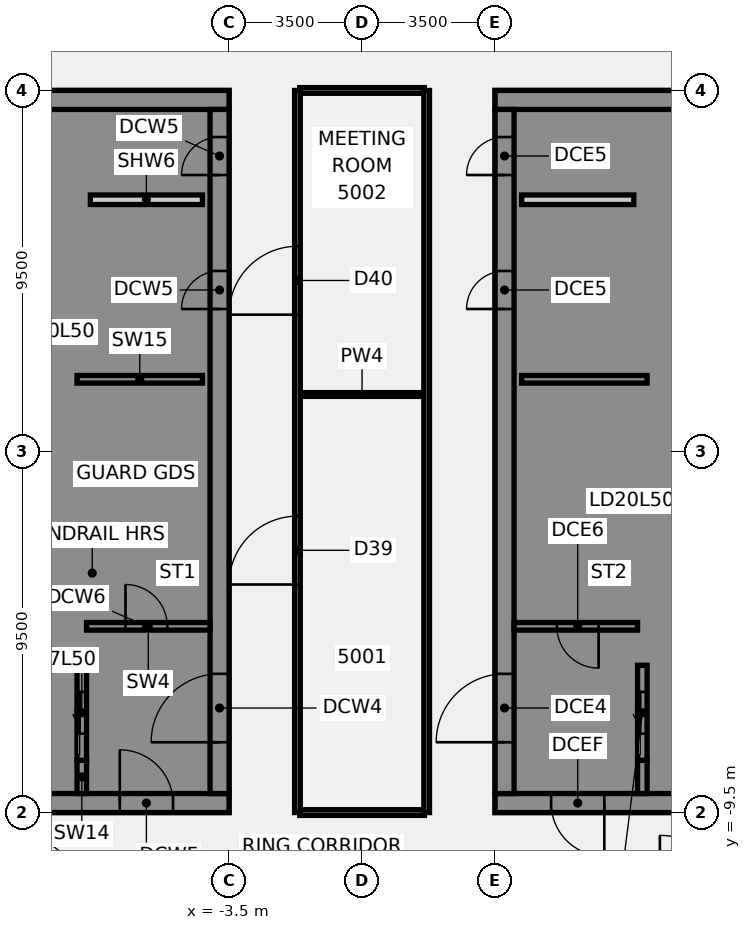
"""IFC4 building model, lengths in metres.
Left out: names, types, materials, properties, quantities, classifications, styles, units other than length and angle.
Written with IfcOpenShell. Run it as: python <this file> out.ifc"""

import sys

from ifc_helpers import new_model, si_unit, direction, frame, frame_2d, origin, place, context, subcontext, project, spatial, polyline, rectangle, outline, extrude, element, fill, save


model = new_model("IFC4")
c1 = context("Model", 3, precision=1e-05, world=origin(), true_north=direction((0.0, 1.0)))
c2 = subcontext(c1, "Body", "Model", "MODEL_VIEW")
j1 = project(units=[si_unit("LENGTHUNIT", "METRE"), si_unit("PLANEANGLEUNIT", "RADIAN")], contexts=[c1])
p1 = place(None, origin())
s1 = spatial("IfcSite", under=j1, at=p1, CompositionType="ELEMENT")
p2 = place(p1, origin())
s2 = spatial("IfcBuilding", under=s1, at=p2, CompositionType="ELEMENT")
p3 = place(p2, frame((0.0, 0.0, 200.5)))
s3 = spatial("IfcBuildingStorey", under=s2, at=p3, CompositionType="ELEMENT", Elevation=200.5)
p4 = place(p3, frame((-1.64, -9.5, 0.0), z_axis=(0.0, 0.0, 1.0), x_axis=(1.0, 0.0, 0.0)))
e1 = element("IfcWall", 1, at=p4, inside=s3, PredefinedType="PARTITIONING", context=c2, shape_type="SweptSolid", body=[
    extrude(rectangle(XDim=3.28, YDim=0.15, at=frame_2d((1.64, 0.0))), origin(), (0.0, 0.0, 1.0), 2.864),
])
p5 = place(p3, frame((-1.64, 1.5, 0.0), z_axis=(0.0, 0.0, 1.0), x_axis=(1.0, 0.0, 0.0)))
e2 = element("IfcWall", 2, at=p5, inside=s3, PredefinedType="PARTITIONING", context=c2, shape_type="SweptSolid", body=[
    extrude(rectangle(XDim=3.28, YDim=0.1, at=frame_2d((1.64, 0.0))), origin(), (0.0, 0.0, 1.0), 2.864),
])
p6 = place(p3, frame((-1.64, 9.5, 0.0), z_axis=(0.0, 0.0, 1.0), x_axis=(1.0, 0.0, 0.0)))
e3 = element("IfcWall", 3, at=p6, inside=s3, PredefinedType="PARTITIONING", context=c2, shape_type="SweptSolid", body=[
    extrude(rectangle(XDim=3.28, YDim=0.15, at=frame_2d((1.64, 0.0))), origin(), (0.0, 0.0, 1.0), 2.864),
])
p7 = place(p3, frame((-1.7, -9.5, 0.0), z_axis=(0.0, 0.0, 1.0), x_axis=(0.0, 1.0, 0.0)))
e4 = element("IfcWall", 4, at=p7, inside=s3, PredefinedType="PARTITIONING", context=c2, shape_type="SweptSolid", body=[
    extrude(rectangle(XDim=19.0, YDim=0.15, at=frame_2d((9.5, 0.0))), origin(), (0.0, 0.0, 1.0), 2.864),
])
p8 = place(p7, frame((6.0, 0.0, 0.0)))
e5 = element("IfcOpeningElement", 5, at=p8, cuts=e4, PredefinedType="OPENING", context=c2, shape_type="SweptSolid", body=[
    extrude(rectangle(XDim=1.8, YDim=2.1, at=frame_2d((0.9, 1.05))), frame((0.0, 0.085, 0.0), z_axis=(0.0, -1.0, 0.0), x_axis=(1.0, 0.0, 0.0)), (0.0, 0.0, 1.0), 0.17),
])
p9 = place(p7, frame((13.1, 0.0, 0.0)))
e6 = element("IfcOpeningElement", 6, at=p9, cuts=e4, PredefinedType="OPENING", context=c2, shape_type="SweptSolid", body=[
    extrude(rectangle(XDim=1.8, YDim=2.1, at=frame_2d((0.9, 1.05))), frame((0.0, 0.085, 0.0), z_axis=(0.0, -1.0, 0.0), x_axis=(1.0, 0.0, 0.0)), (0.0, 0.0, 1.0), 0.17),
])
p10 = place(p3, frame((1.7, -9.5, 0.0), z_axis=(0.0, 0.0, 1.0), x_axis=(0.0, 1.0, 0.0)))
e7 = element("IfcWall", 7, at=p10, inside=s3, PredefinedType="PARTITIONING", context=c2, shape_type="SweptSolid", body=[
    extrude(rectangle(XDim=19.0, YDim=0.15, at=frame_2d((9.5, 0.0))), origin(), (0.0, 0.0, 1.0), 2.864),
])
p11 = place(p3, frame((-16.5, -9.25, 0.0), z_axis=(0.0, 0.0, 1.0), x_axis=(1.0, 0.0, 0.0)))
e8 = element("IfcWall", 8, at=p11, inside=s3, PredefinedType="SHEAR", context=c2, shape_type="SweptSolid", body=[
    extrude(rectangle(XDim=13.0, YDim=0.5, at=frame_2d((6.5, 0.0))), origin(), (0.0, 0.0, 1.0), 3.46),
])
p12 = place(p11, frame((4.15, 0.0, 0.0)))
e9 = element("IfcOpeningElement", 9, at=p12, cuts=e8, PredefinedType="OPENING", context=c2, shape_type="SweptSolid", body=[
    extrude(rectangle(XDim=1.4, YDim=2.1, at=frame_2d((0.7, 1.05))), frame((0.0, 0.26, 0.0), z_axis=(0.0, -1.0, 0.0), x_axis=(1.0, 0.0, 0.0)), (0.0, 0.0, 1.0), 0.52),
])
p13 = place(p11, frame((10.125, 0.0, 0.0)))
e10 = element("IfcOpeningElement", 10, at=p13, cuts=e8, PredefinedType="OPENING", context=c2, shape_type="SweptSolid", body=[
    extrude(rectangle(XDim=1.4, YDim=2.1, at=frame_2d((0.7, 1.05))), frame((0.0, 0.26, 0.0), z_axis=(0.0, -1.0, 0.0), x_axis=(1.0, 0.0, 0.0)), (0.0, 0.0, 1.0), 0.52),
])
p14 = place(p3, frame((-16.5, 9.25, 0.0), z_axis=(0.0, 0.0, 1.0), x_axis=(1.0, 0.0, 0.0)))
e11 = element("IfcWall", 11, at=p14, inside=s3, PredefinedType="SHEAR", context=c2, shape_type="SweptSolid", body=[
    extrude(rectangle(XDim=13.0, YDim=0.5, at=frame_2d((6.5, 0.0))), origin(), (0.0, 0.0, 1.0), 3.46),
])
p15 = place(p3, origin())
e12 = element("IfcWall", 12, at=p15, inside=s3, PredefinedType="SHEAR", context=c2, shape_type="SweptSolid", body=[
    extrude(outline(polyline([(-9.8, -5.375), (-9.8, -5.625), (-7.5, -5.625), (-7.25, -5.625), (-7.25, 9.0), (-7.5, 9.0), (-9.8, 9.0), (-9.8, 8.125), (-7.5, 8.125), (-7.5, 5.625), (-9.8, 5.625), (-9.8, 5.375), (-7.5, 5.375), (-7.5, 2.875), (-9.8, 2.875), (-9.8, 2.625), (-7.5, 2.625), (-7.5, 0.125), (-9.8, 0.125), (-9.8, -0.125), (-7.5, -0.125), (-7.5, -2.625), (-9.8, -2.625), (-9.8, -2.875), (-7.5, -2.875), (-7.5, -5.375), (-9.8, -5.375)])), origin(), (0.0, 0.0, 1.0), 3.46),
])
p16 = place(p3, origin())
e13 = element("IfcWall", 13, at=p16, inside=s3, PredefinedType="SHEAR", context=c2, shape_type="SweptSolid", body=[
    extrude(outline(polyline([(-7.5, -8.125), (-9.55, -8.125), (-9.55, -5.625), (-9.8, -5.625), (-9.8, -8.125), (-9.8, -9.0), (-7.5, -9.0), (-7.5, -8.125)])), origin(), (0.0, 0.0, 1.0), 3.46),
])
p17 = place(p3, frame((-7.375, -9.0, 0.0), z_axis=(0.0, 0.0, 1.0), x_axis=(0.0, 1.0, 0.0)))
e14 = element("IfcWall", 14, at=p17, inside=s3, PredefinedType="SHEAR", context=c2, shape_type="SweptSolid", body=[
    extrude(rectangle(XDim=0.875, YDim=0.25, at=frame_2d((0.438, 0.0))), origin(), (0.0, 0.0, 1.0), 3.46),
])
p18 = place(p3, frame((-7.5, 1.9, 0.0), z_axis=(0.0, 0.0, 1.0), x_axis=(1.0, 0.0, 0.0)))
e15 = element("IfcWall", 15, at=p18, inside=s3, PredefinedType="SHEAR", context=c2, shape_type="SweptSolid", body=[
    extrude(rectangle(XDim=3.3, YDim=0.2, at=frame_2d((1.65, 0.0))), origin(), (0.0, 0.0, 1.0), 3.46),
])
p19 = place(p3, frame((-7.375, -8.125, 0.0), z_axis=(0.0, 0.0, 1.0), x_axis=(0.0, 1.0, 0.0)))
e16 = element("IfcWall", 16, at=p19, inside=s3, PredefinedType="SHEAR", context=c2, shape_type="SweptSolid", body=[
    extrude(rectangle(XDim=2.5, YDim=0.25, at=frame_2d((1.25, 0.0))), origin(), (0.0, 0.0, 1.0), 3.46),
])
p20 = place(p19, frame((0.7, 0.0, 0.0)))
e17 = element("IfcOpeningElement", 17, at=p20, cuts=e16, PredefinedType="OPENING", context=c2, shape_type="SweptSolid", body=[
    extrude(rectangle(XDim=1.1, YDim=2.1, at=frame_2d((0.55, 1.05))), frame((0.0, 0.135, 0.0), z_axis=(0.0, -1.0, 0.0), x_axis=(1.0, 0.0, 0.0)), (0.0, 0.0, 1.0), 0.27),
])
p21 = place(p3, frame((-3.75, -9.0, 0.0), z_axis=(0.0, 0.0, 1.0), x_axis=(0.0, 1.0, 0.0)))
e18 = element("IfcWall", 18, at=p21, inside=s3, PredefinedType="SHEAR", context=c2, shape_type="SweptSolid", body=[
    extrude(rectangle(XDim=18.0, YDim=0.5, at=frame_2d((9.0, 0.0))), origin(), (0.0, 0.0, 1.0), 3.46),
])
p22 = place(p21, frame((1.35, 0.0, 0.0)))
e19 = element("IfcOpeningElement", 19, at=p22, cuts=e18, PredefinedType="OPENING", context=c2, shape_type="SweptSolid", body=[
    extrude(rectangle(XDim=1.8, YDim=2.1, at=frame_2d((0.9, 1.05))), frame((0.0, 0.26, 0.0), z_axis=(0.0, -1.0, 0.0), x_axis=(1.0, 0.0, 0.0)), (0.0, 0.0, 1.0), 0.52),
])
p23 = place(p21, frame((12.75, 0.0, 0.0)))
e20 = element("IfcOpeningElement", 20, at=p23, cuts=e18, PredefinedType="OPENING", context=c2, shape_type="SweptSolid", body=[
    extrude(rectangle(XDim=1.0, YDim=2.1, at=frame_2d((0.5, 1.05))), frame((0.0, 0.26, 0.0), z_axis=(0.0, -1.0, 0.0), x_axis=(1.0, 0.0, 0.0)), (0.0, 0.0, 1.0), 0.52),
])
p24 = place(p21, frame((16.274, 0.0, 0.0)))
e21 = element("IfcOpeningElement", 21, at=p24, cuts=e18, PredefinedType="OPENING", context=c2, shape_type="SweptSolid", body=[
    extrude(rectangle(XDim=1.0, YDim=2.1, at=frame_2d((0.5, 1.05))), frame((0.0, 0.26, 0.0), z_axis=(0.0, -1.0, 0.0), x_axis=(1.0, 0.0, 0.0)), (0.0, 0.0, 1.0), 0.52),
])
p25 = place(p3, frame((-7.15, 6.624, 0.0), z_axis=(0.0, 0.0, 1.0), x_axis=(1.0, 0.0, 0.0)))
e22 = element("IfcWall", 22, at=p25, inside=s3, PredefinedType="PARTITIONING", context=c2, shape_type="SweptSolid", body=[
    extrude(rectangle(XDim=2.95, YDim=0.25, at=frame_2d((1.475, 0.0))), origin(), (0.0, 0.0, 1.0), 3.46),
])
p26 = place(p3, frame((-7.25, -4.6, 0.0), z_axis=(0.0, 0.0, 1.0), x_axis=(1.0, 0.0, 0.0)))
e23 = element("IfcWall", 23, at=p26, inside=s3, PredefinedType="SHEAR", context=c2, shape_type="SweptSolid", body=[
    extrude(rectangle(XDim=3.25, YDim=0.2, at=frame_2d((1.625, 0.0))), origin(), (0.0, 0.0, 1.0), 3.46),
])
p27 = place(p26, frame((1.025, 0.0, 0.0)))
e24 = element("IfcOpeningElement", 24, at=p27, cuts=e23, PredefinedType="OPENING", context=c2, shape_type="SweptSolid", body=[
    extrude(rectangle(XDim=1.1, YDim=2.1, at=frame_2d((0.55, 1.05))), frame((0.0, 0.11, 0.0), z_axis=(0.0, -1.0, 0.0), x_axis=(1.0, 0.0, 0.0)), (0.0, 0.0, 1.0), 0.22),
])
p28 = place(p3, frame((16.5, -9.25, 0.0), z_axis=(0.0, 0.0, 1.0), x_axis=(-1.0, 0.0, 0.0)))
e25 = element("IfcWall", 25, at=p28, inside=s3, PredefinedType="SHEAR", context=c2, shape_type="SweptSolid", body=[
    extrude(rectangle(XDim=13.0, YDim=0.5, at=frame_2d((6.5, 0.0))), origin(), (0.0, 0.0, 1.0), 3.46),
])
p29 = place(p28, frame((4.15, 0.0, 0.0)))
e26 = element("IfcOpeningElement", 26, at=p29, cuts=e25, PredefinedType="OPENING", context=c2, shape_type="SweptSolid", body=[
    extrude(rectangle(XDim=1.4, YDim=2.1, at=frame_2d((0.7, 1.05))), frame((0.0, 0.26, 0.0), z_axis=(0.0, -1.0, 0.0), x_axis=(1.0, 0.0, 0.0)), (0.0, 0.0, 1.0), 0.52),
])
p30 = place(p28, frame((10.125, 0.0, 0.0)))
e27 = element("IfcOpeningElement", 27, at=p30, cuts=e25, PredefinedType="OPENING", context=c2, shape_type="SweptSolid", body=[
    extrude(rectangle(XDim=1.4, YDim=2.1, at=frame_2d((0.7, 1.05))), frame((0.0, 0.26, 0.0), z_axis=(0.0, -1.0, 0.0), x_axis=(1.0, 0.0, 0.0)), (0.0, 0.0, 1.0), 0.52),
])
p31 = place(p3, frame((16.5, 9.25, 0.0), z_axis=(0.0, 0.0, 1.0), x_axis=(-1.0, 0.0, 0.0)))
e28 = element("IfcWall", 28, at=p31, inside=s3, PredefinedType="SHEAR", context=c2, shape_type="SweptSolid", body=[
    extrude(rectangle(XDim=13.0, YDim=0.5, at=frame_2d((6.5, 0.0))), origin(), (0.0, 0.0, 1.0), 3.46),
])
p32 = place(p3, origin())
e29 = element("IfcWall", 29, at=p32, inside=s3, PredefinedType="SHEAR", context=c2, shape_type="SweptSolid", body=[
    extrude(outline(polyline([(9.8, -5.375), (7.5, -5.375), (7.5, -2.875), (9.8, -2.875), (9.8, -2.625), (7.5, -2.625), (7.5, -0.125), (9.8, -0.125), (9.8, 0.125), (7.5, 0.125), (7.5, 2.625), (9.8, 2.625), (9.8, 2.875), (7.5, 2.875), (7.5, 5.375), (9.8, 5.375), (9.8, 5.625), (7.5, 5.625), (7.5, 8.125), (9.8, 8.125), (9.8, 9.0), (7.5, 9.0), (7.25, 9.0), (7.25, -5.625), (7.5, -5.625), (9.8, -5.625), (9.8, -5.375)])), origin(), (0.0, 0.0, 1.0), 3.46),
])
p33 = place(p3, origin())
e30 = element("IfcWall", 30, at=p33, inside=s3, PredefinedType="SHEAR", context=c2, shape_type="SweptSolid", body=[
    extrude(outline(polyline([(7.5, -8.125), (7.5, -9.0), (9.8, -9.0), (9.8, -8.125), (9.8, -5.625), (9.55, -5.625), (9.55, -8.125), (7.5, -8.125)])), origin(), (0.0, 0.0, 1.0), 3.46),
])
p34 = place(p3, frame((7.375, -9.0, 0.0), z_axis=(0.0, 0.0, 1.0), x_axis=(0.0, 1.0, 0.0)))
e31 = element("IfcWall", 31, at=p34, inside=s3, PredefinedType="SHEAR", context=c2, shape_type="SweptSolid", body=[
    extrude(rectangle(XDim=0.875, YDim=0.25, at=frame_2d((0.438, 0.0))), origin(), (0.0, 0.0, 1.0), 3.46),
])
p35 = place(p3, frame((7.5, 1.9, 0.0), z_axis=(0.0, 0.0, 1.0), x_axis=(-1.0, 0.0, 0.0)))
e32 = element("IfcWall", 32, at=p35, inside=s3, PredefinedType="SHEAR", context=c2, shape_type="SweptSolid", body=[
    extrude(rectangle(XDim=3.3, YDim=0.2, at=frame_2d((1.65, 0.0))), origin(), (0.0, 0.0, 1.0), 3.46),
])
p36 = place(p3, frame((7.375, -8.125, 0.0), z_axis=(0.0, 0.0, 1.0), x_axis=(0.0, 1.0, 0.0)))
e33 = element("IfcWall", 33, at=p36, inside=s3, PredefinedType="SHEAR", context=c2, shape_type="SweptSolid", body=[
    extrude(rectangle(XDim=2.5, YDim=0.25, at=frame_2d((1.25, 0.0))), origin(), (0.0, 0.0, 1.0), 3.46),
])
p37 = place(p36, frame((0.7, 0.0, 0.0)))
e34 = element("IfcOpeningElement", 34, at=p37, cuts=e33, PredefinedType="OPENING", context=c2, shape_type="SweptSolid", body=[
    extrude(rectangle(XDim=1.1, YDim=2.1, at=frame_2d((0.55, 1.05))), frame((0.0, 0.135, 0.0), z_axis=(0.0, -1.0, 0.0), x_axis=(1.0, 0.0, 0.0)), (0.0, 0.0, 1.0), 0.27),
])
p38 = place(p3, frame((3.75, -9.0, 0.0), z_axis=(0.0, 0.0, 1.0), x_axis=(0.0, 1.0, 0.0)))
e35 = element("IfcWall", 35, at=p38, inside=s3, PredefinedType="SHEAR", context=c2, shape_type="SweptSolid", body=[
    extrude(rectangle(XDim=18.0, YDim=0.5, at=frame_2d((9.0, 0.0))), origin(), (0.0, 0.0, 1.0), 3.46),
])
p39 = place(p38, frame((1.35, 0.0, 0.0)))
e36 = element("IfcOpeningElement", 36, at=p39, cuts=e35, PredefinedType="OPENING", context=c2, shape_type="SweptSolid", body=[
    extrude(rectangle(XDim=1.8, YDim=2.1, at=frame_2d((0.9, 1.05))), frame((0.0, 0.26, 0.0), z_axis=(0.0, -1.0, 0.0), x_axis=(1.0, 0.0, 0.0)), (0.0, 0.0, 1.0), 0.52),
])
p40 = place(p38, frame((12.75, 0.0, 0.0)))
e37 = element("IfcOpeningElement", 37, at=p40, cuts=e35, PredefinedType="OPENING", context=c2, shape_type="SweptSolid", body=[
    extrude(rectangle(XDim=1.0, YDim=2.1, at=frame_2d((0.5, 1.05))), frame((0.0, 0.26, 0.0), z_axis=(0.0, -1.0, 0.0), x_axis=(1.0, 0.0, 0.0)), (0.0, 0.0, 1.0), 0.52),
])
p41 = place(p38, frame((16.274, 0.0, 0.0)))
e38 = element("IfcOpeningElement", 38, at=p41, cuts=e35, PredefinedType="OPENING", context=c2, shape_type="SweptSolid", body=[
    extrude(rectangle(XDim=1.0, YDim=2.1, at=frame_2d((0.5, 1.05))), frame((0.0, 0.26, 0.0), z_axis=(0.0, -1.0, 0.0), x_axis=(1.0, 0.0, 0.0)), (0.0, 0.0, 1.0), 0.52),
])
p42 = place(p3, frame((7.15, 6.624, 0.0), z_axis=(0.0, 0.0, 1.0), x_axis=(-1.0, 0.0, 0.0)))
e39 = element("IfcWall", 39, at=p42, inside=s3, PredefinedType="PARTITIONING", context=c2, shape_type="SweptSolid", body=[
    extrude(rectangle(XDim=2.95, YDim=0.25, at=frame_2d((1.475, 0.0))), origin(), (0.0, 0.0, 1.0), 3.46),
])
p43 = place(p3, frame((7.25, -4.6, 0.0), z_axis=(0.0, 0.0, 1.0), x_axis=(-1.0, 0.0, 0.0)))
e40 = element("IfcWall", 40, at=p43, inside=s3, PredefinedType="SHEAR", context=c2, shape_type="SweptSolid", body=[
    extrude(rectangle(XDim=3.25, YDim=0.2, at=frame_2d((1.625, 0.0))), origin(), (0.0, 0.0, 1.0), 3.46),
])
p44 = place(p43, frame((1.025, 0.0, 0.0)))
e41 = element("IfcOpeningElement", 41, at=p44, cuts=e40, PredefinedType="OPENING", context=c2, shape_type="SweptSolid", body=[
    extrude(rectangle(XDim=1.1, YDim=2.1, at=frame_2d((0.55, 1.05))), frame((0.0, 0.11, 0.0), z_axis=(0.0, -1.0, 0.0), x_axis=(1.0, 0.0, 0.0)), (0.0, 0.0, 1.0), 0.22),
])
p45 = place(p8, frame((1.8, 0.0, 0.0), z_axis=(0.0, 0.0, 1.0), x_axis=(-1.0, 0.0, 0.0)))
e42 = element("IfcDoor", 42, at=p45, inside=s3, OperationType="DOUBLE_DOOR_SINGLE_SWING", PredefinedType="DOOR", context=c2, shape_type="SweptSolid", body=[
    extrude(rectangle(XDim=1.8, YDim=2.1, at=frame_2d((0.9, 1.05))), frame((0.0, 0.025, 0.0), z_axis=(0.0, -1.0, 0.0), x_axis=(1.0, 0.0, 0.0)), (0.0, 0.0, 1.0), 0.05),
])
fill(e5, e42)
p46 = place(p9, frame((1.8, 0.0, 0.0), z_axis=(0.0, 0.0, 1.0), x_axis=(-1.0, 0.0, 0.0)))
e43 = element("IfcDoor", 43, at=p46, inside=s3, OperationType="DOUBLE_DOOR_SINGLE_SWING", PredefinedType="DOOR", context=c2, shape_type="SweptSolid", body=[
    extrude(rectangle(XDim=1.8, YDim=2.1, at=frame_2d((0.9, 1.05))), frame((0.0, 0.025, 0.0), z_axis=(0.0, -1.0, 0.0), x_axis=(1.0, 0.0, 0.0)), (0.0, 0.0, 1.0), 0.05),
])
fill(e6, e43)
p47 = place(p13, origin())
e44 = element("IfcDoor", 44, at=p47, inside=s3, OperationType="SINGLE_SWING_LEFT", PredefinedType="DOOR", context=c2, shape_type="SweptSolid", body=[
    extrude(rectangle(XDim=1.4, YDim=2.1, at=frame_2d((0.7, 1.05))), frame((0.0, 0.025, 0.0), z_axis=(0.0, -1.0, 0.0), x_axis=(1.0, 0.0, 0.0)), (0.0, 0.0, 1.0), 0.05),
])
fill(e10, e44)
p48 = place(p22, origin())
e45 = element("IfcDoor", 45, at=p48, inside=s3, OperationType="SINGLE_SWING_LEFT", PredefinedType="DOOR", context=c2, shape_type="SweptSolid", body=[
    extrude(rectangle(XDim=1.8, YDim=2.1, at=frame_2d((0.9, 1.05))), frame((0.0, 0.025, 0.0), z_axis=(0.0, -1.0, 0.0), x_axis=(1.0, 0.0, 0.0)), (0.0, 0.0, 1.0), 0.05),
])
fill(e19, e45)
p49 = place(p23, origin())
e46 = element("IfcDoor", 46, at=p49, inside=s3, OperationType="SINGLE_SWING_LEFT", PredefinedType="DOOR", context=c2, shape_type="SweptSolid", body=[
    extrude(rectangle(XDim=1.0, YDim=2.1, at=frame_2d((0.5, 1.05))), frame((0.0, 0.225, 0.0), z_axis=(0.0, -1.0, 0.0), x_axis=(1.0, 0.0, 0.0)), (0.0, 0.0, 1.0), 0.05),
])
fill(e20, e46)
p50 = place(p24, origin())
e47 = element("IfcDoor", 47, at=p50, inside=s3, OperationType="SINGLE_SWING_LEFT", PredefinedType="DOOR", context=c2, shape_type="SweptSolid", body=[
    extrude(rectangle(XDim=1.0, YDim=2.1, at=frame_2d((0.5, 1.05))), frame((0.0, 0.225, 0.0), z_axis=(0.0, -1.0, 0.0), x_axis=(1.0, 0.0, 0.0)), (0.0, 0.0, 1.0), 0.05),
])
fill(e21, e47)
p51 = place(p27, origin())
e48 = element("IfcDoor", 48, at=p51, inside=s3, OperationType="SINGLE_SWING_LEFT", PredefinedType="DOOR", context=c2, shape_type="SweptSolid", body=[
    extrude(rectangle(XDim=1.1, YDim=2.1, at=frame_2d((0.55, 1.05))), frame((0.0, 0.025, 0.0), z_axis=(0.0, -1.0, 0.0), x_axis=(1.0, 0.0, 0.0)), (0.0, 0.0, 1.0), 0.05),
])
fill(e24, e48)
p52 = place(p20, origin())
e49 = element("IfcDoor", 49, at=p52, inside=s3, OperationType="SLIDING_TO_LEFT", PredefinedType="DOOR", context=c2, shape_type="SweptSolid", body=[
    extrude(rectangle(XDim=1.1, YDim=2.1, at=frame_2d((0.55, 1.05))), frame((0.0, 0.025, 0.0), z_axis=(0.0, -1.0, 0.0), x_axis=(1.0, 0.0, 0.0)), (0.0, 0.0, 1.0), 0.05),
])
fill(e17, e49)
p53 = place(p30, origin())
e50 = element("IfcDoor", 50, at=p53, inside=s3, OperationType="SINGLE_SWING_LEFT", PredefinedType="DOOR", context=c2, shape_type="SweptSolid", body=[
    extrude(rectangle(XDim=1.4, YDim=2.1, at=frame_2d((0.7, 1.05))), frame((0.0, 0.025, 0.0), z_axis=(0.0, -1.0, 0.0), x_axis=(1.0, 0.0, 0.0)), (0.0, 0.0, 1.0), 0.05),
])
fill(e27, e50)
p54 = place(p39, origin())
e51 = element("IfcDoor", 51, at=p54, inside=s3, OperationType="SINGLE_SWING_LEFT", PredefinedType="DOOR", context=c2, shape_type="SweptSolid", body=[
    extrude(rectangle(XDim=1.8, YDim=2.1, at=frame_2d((0.9, 1.05))), frame((0.0, 0.025, 0.0), z_axis=(0.0, -1.0, 0.0), x_axis=(1.0, 0.0, 0.0)), (0.0, 0.0, 1.0), 0.05),
])
fill(e36, e51)
p55 = place(p40, origin())
e52 = element("IfcDoor", 52, at=p55, inside=s3, OperationType="SINGLE_SWING_LEFT", PredefinedType="DOOR", context=c2, shape_type="SweptSolid", body=[
    extrude(rectangle(XDim=1.0, YDim=2.1, at=frame_2d((0.5, 1.05))), frame((0.0, -0.175, 0.0), z_axis=(0.0, -1.0, 0.0), x_axis=(1.0, 0.0, 0.0)), (0.0, 0.0, 1.0), 0.05),
])
fill(e37, e52)
p56 = place(p41, origin())
e53 = element("IfcDoor", 53, at=p56, inside=s3, OperationType="SINGLE_SWING_LEFT", PredefinedType="DOOR", context=c2, shape_type="SweptSolid", body=[
    extrude(rectangle(XDim=1.0, YDim=2.1, at=frame_2d((0.5, 1.05))), frame((0.0, -0.175, 0.0), z_axis=(0.0, -1.0, 0.0), x_axis=(1.0, 0.0, 0.0)), (0.0, 0.0, 1.0), 0.05),
])
fill(e38, e53)
p57 = place(p44, origin())
e54 = element("IfcDoor", 54, at=p57, inside=s3, OperationType="SINGLE_SWING_LEFT", PredefinedType="DOOR", context=c2, shape_type="SweptSolid", body=[
    extrude(rectangle(XDim=1.1, YDim=2.1, at=frame_2d((0.55, 1.05))), frame((0.0, 0.025, 0.0), z_axis=(0.0, -1.0, 0.0), x_axis=(1.0, 0.0, 0.0)), (0.0, 0.0, 1.0), 0.05),
])
fill(e41, e54)
p58 = place(p37, origin())
e55 = element("IfcDoor", 55, at=p58, inside=s3, OperationType="SLIDING_TO_LEFT", PredefinedType="DOOR", context=c2, shape_type="SweptSolid", body=[
    extrude(rectangle(XDim=1.1, YDim=2.1, at=frame_2d((0.55, 1.05))), frame((0.0, 0.025, 0.0), z_axis=(0.0, -1.0, 0.0), x_axis=(1.0, 0.0, 0.0)), (0.0, 0.0, 1.0), 0.05),
])
fill(e34, e55)
save(model, sys.argv[1])
